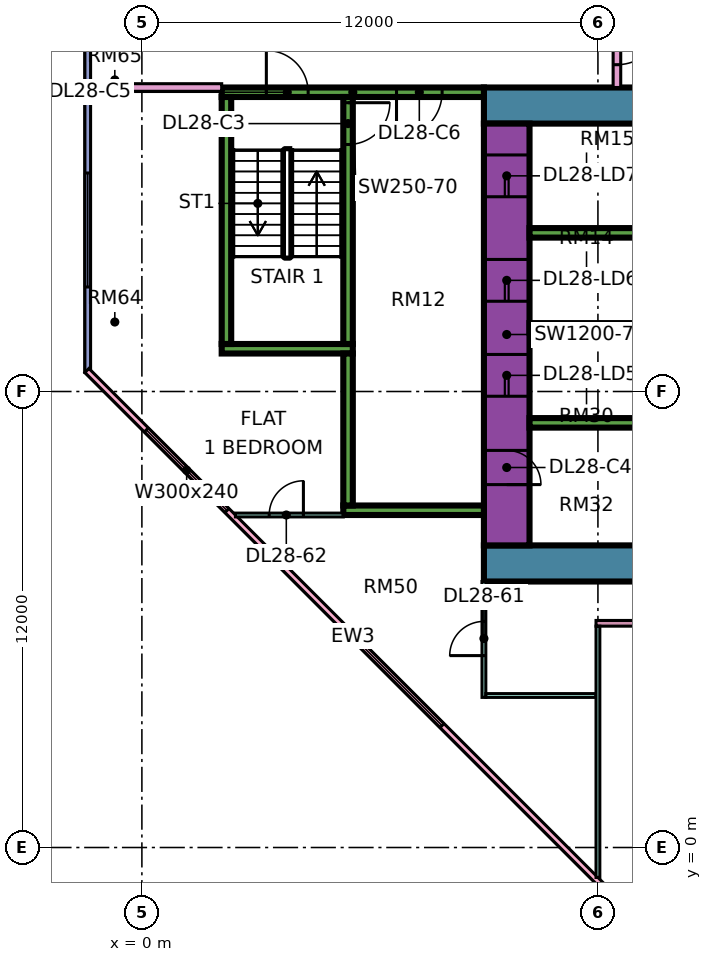
"""IFC4 building model, lengths in metres.
Left out: names, types, materials, properties, quantities, classifications, styles, units other than length and angle.
Written with IfcOpenShell. Run it as: python <this file> out.ifc"""

import sys

from ifc_helpers import new_model, si_unit, direction, frame, frame_2d, origin, place, context, subcontext, project, spatial, rectangle, extrude, element, fill, save


model = new_model("IFC4")
c1 = context("Model", 3, precision=1e-05, world=origin(), true_north=direction((0.0, 1.0)))
c2 = subcontext(c1, "Body", "Model", "MODEL_VIEW")
j1 = project(units=[si_unit("LENGTHUNIT", "METRE"), si_unit("PLANEANGLEUNIT", "RADIAN")], contexts=[c1])
p1 = place(None, origin())
s1 = spatial("IfcSite", under=j1, at=p1, CompositionType="ELEMENT")
p2 = place(p1, origin())
s2 = spatial("IfcBuilding", under=s1, at=p2, CompositionType="ELEMENT")
p3 = place(p2, frame((0.0, 0.0, 121.9)))
s3 = spatial("IfcBuildingStorey", under=s2, at=p3, CompositionType="ELEMENT", Elevation=121.9)
p4 = place(p3, frame((9.0, 7.475, 0.0), z_axis=(0.0, 0.0, 1.0), x_axis=(1.0, 0.0, 0.0)))
e1 = element("IfcWall", 1, at=p4, inside=s3, PredefinedType="SHEAR", context=c2, shape_type="SweptSolid", body=[
    extrude(rectangle(XDim=25.0, YDim=0.95, at=frame_2d((12.5, 0.0))), origin(), (0.0, 0.0, 1.0), 3.75),
])
p5 = place(p3, frame((9.0, 19.525, 0.0), z_axis=(0.0, 0.0, 1.0), x_axis=(1.0, 0.0, 0.0)))
e2 = element("IfcWall", 2, at=p5, inside=s3, PredefinedType="SHEAR", context=c2, shape_type="SweptSolid", body=[
    extrude(rectangle(XDim=25.0, YDim=0.95, at=frame_2d((12.5, 0.0))), origin(), (0.0, 0.0, 1.0), 3.75),
])
p6 = place(p5, frame((19.1, 0.0, 0.0)))
e3 = element("IfcOpeningElement", 3, at=p6, cuts=e2, PredefinedType="OPENING", context=c2, shape_type="SweptSolid", body=[
    extrude(rectangle(XDim=1.8, YDim=2.4, at=frame_2d((0.9, 1.2))), frame((0.0, 0.485, 0.0), z_axis=(0.0, -1.0, 0.0), x_axis=(1.0, 0.0, 0.0)), (0.0, 0.0, 1.0), 0.97),
])
p7 = place(p3, frame((9.6, 7.95, 0.0), z_axis=(0.0, 0.0, 1.0), x_axis=(0.0, 1.0, 0.0)))
e4 = element("IfcWall", 4, at=p7, inside=s3, PredefinedType="SHEAR", context=c2, shape_type="SweptSolid", body=[
    extrude(rectangle(XDim=11.1, YDim=1.2, at=frame_2d((5.55, 0.0))), origin(), (0.0, 0.0, 1.0), 3.75),
])
p8 = place(p7, frame((3.925, 0.0, 0.0)))
e5 = element("IfcOpeningElement", 5, at=p8, cuts=e4, PredefinedType="OPENING", context=c2, shape_type="SweptSolid", body=[
    extrude(rectangle(XDim=1.1, YDim=2.2, at=frame_2d((0.55, 1.1))), frame((0.0, 0.61, 0.0), z_axis=(0.0, -1.0, 0.0), x_axis=(1.0, 0.0, 0.0)), (0.0, 0.0, 1.0), 1.22),
])
p9 = place(p7, frame((6.425, 0.0, 0.0)))
e6 = element("IfcOpeningElement", 6, at=p9, cuts=e4, PredefinedType="OPENING", context=c2, shape_type="SweptSolid", body=[
    extrude(rectangle(XDim=1.1, YDim=2.2, at=frame_2d((0.55, 1.1))), frame((0.0, 0.61, 0.0), z_axis=(0.0, -1.0, 0.0), x_axis=(1.0, 0.0, 0.0)), (0.0, 0.0, 1.0), 1.22),
])
p10 = place(p7, frame((9.175, 0.0, 0.0)))
e7 = element("IfcOpeningElement", 7, at=p10, cuts=e4, PredefinedType="OPENING", context=c2, shape_type="SweptSolid", body=[
    extrude(rectangle(XDim=1.1, YDim=2.2, at=frame_2d((0.55, 1.1))), frame((0.0, 0.61, 0.0), z_axis=(0.0, -1.0, 0.0), x_axis=(1.0, 0.0, 0.0)), (0.0, 0.0, 1.0), 1.22),
])
p11 = place(p7, frame((1.6, 0.0, 0.0)))
e8 = element("IfcOpeningElement", 8, at=p11, cuts=e4, PredefinedType="OPENING", context=c2, shape_type="SweptSolid", body=[
    extrude(rectangle(XDim=0.9, YDim=2.1, at=frame_2d((0.45, 1.05))), frame((0.0, 0.61, 0.0), z_axis=(0.0, -1.0, 0.0), x_axis=(1.0, 0.0, 0.0)), (0.0, 0.0, 1.0), 1.22),
])
for number, where, z_axis, x_axis in (
    (9, (10.2, 11.175, 0.0), (0.0, 0.0, 1.0), (1.0, 0.0, 0.0)),
    (10, (10.2, 13.675, 0.0), (0.0, 0.0, 1.0), (1.0, 0.0, 0.0)),
    (11, (10.2, 16.175, 0.0), (0.0, 0.0, 1.0), (1.0, 0.0, 0.0)),
):
    element("IfcWall", number, at=place(p3, frame(where, z_axis=z_axis, x_axis=x_axis)), inside=s3, PredefinedType="SHEAR", context=c2, shape_type="SweptSolid", body=[
        extrude(rectangle(XDim=3.0, YDim=0.25, at=frame_2d((1.5, 0.0))), origin(), (0.0, 0.0, 1.0), 3.75),
    ])
p12 = place(p3, frame((2.1, 19.875, 0.0), z_axis=(0.0, 0.0, 1.0), x_axis=(1.0, 0.0, 0.0)))
e12 = element("IfcWall", 12, at=p12, inside=s3, PredefinedType="SHEAR", context=c2, shape_type="SweptSolid", body=[
    extrude(rectangle(XDim=6.9, YDim=0.25, at=frame_2d((3.45, 0.0))), origin(), (0.0, 0.0, 1.0), 3.75),
])
p13 = place(p12, frame((1.175, 0.0, 0.0)))
e13 = element("IfcOpeningElement", 13, at=p13, cuts=e12, PredefinedType="OPENING", context=c2, shape_type="SweptSolid", body=[
    extrude(rectangle(XDim=1.1, YDim=2.2, at=frame_2d((0.55, 1.1))), frame((0.0, 0.135, 0.0), z_axis=(0.0, -1.0, 0.0), x_axis=(1.0, 0.0, 0.0)), (0.0, 0.0, 1.0), 0.27),
])
p14 = place(p12, frame((4.6, 0.0, 0.0)))
e14 = element("IfcOpeningElement", 14, at=p14, cuts=e12, PredefinedType="OPENING", context=c2, shape_type="SweptSolid", body=[
    extrude(rectangle(XDim=1.2, YDim=2.2, at=frame_2d((0.6, 1.1))), frame((0.0, 0.135, 0.0), z_axis=(0.0, -1.0, 0.0), x_axis=(1.0, 0.0, 0.0)), (0.0, 0.0, 1.0), 0.27),
])
p15 = place(p3, frame((2.1, 13.125, 0.0), z_axis=(0.0, 0.0, 1.0), x_axis=(1.0, 0.0, 0.0)))
e15 = element("IfcWall", 15, at=p15, inside=s3, PredefinedType="SHEAR", context=c2, shape_type="SweptSolid", body=[
    extrude(rectangle(XDim=3.45, YDim=0.25, at=frame_2d((1.725, 0.0))), origin(), (0.0, 0.0, 1.0), 3.75),
])
p16 = place(p3, frame((2.225, 13.25, 0.0), z_axis=(0.0, 0.0, 1.0), x_axis=(0.0, 1.0, 0.0)))
e16 = element("IfcWall", 16, at=p16, inside=s3, PredefinedType="SHEAR", context=c2, shape_type="SweptSolid", body=[
    extrude(rectangle(XDim=6.5, YDim=0.25, at=frame_2d((3.25, 0.0))), origin(), (0.0, 0.0, 1.0), 3.75),
])
p17 = place(p3, frame((5.425, 13.25, 0.0), z_axis=(0.0, 0.0, 1.0), x_axis=(0.0, 1.0, 0.0)))
e17 = element("IfcWall", 17, at=p17, inside=s3, PredefinedType="SHEAR", context=c2, shape_type="SweptSolid", body=[
    extrude(rectangle(XDim=6.5, YDim=0.25, at=frame_2d((3.25, 0.0))), origin(), (0.0, 0.0, 1.0), 3.75),
])
p18 = place(p17, frame((5.25, 0.0, 0.0)))
e18 = element("IfcOpeningElement", 18, at=p18, cuts=e17, PredefinedType="OPENING", context=c2, shape_type="SweptSolid", body=[
    extrude(rectangle(XDim=1.1, YDim=2.2, at=frame_2d((0.55, 1.1))), frame((0.0, 0.135, 0.0), z_axis=(0.0, -1.0, 0.0), x_axis=(1.0, 0.0, 0.0)), (0.0, 0.0, 1.0), 0.27),
])
p19 = place(p3, frame((5.3, 8.875, 0.0), z_axis=(0.0, 0.0, 1.0), x_axis=(1.0, 0.0, 0.0)))
e19 = element("IfcWall", 19, at=p19, inside=s3, PredefinedType="SHEAR", context=c2, shape_type="SweptSolid", body=[
    extrude(rectangle(XDim=3.7, YDim=0.25, at=frame_2d((1.85, 0.0))), origin(), (0.0, 0.0, 1.0), 3.75),
])
p20 = place(p3, frame((5.425, 9.0, 0.0), z_axis=(0.0, 0.0, 1.0), x_axis=(0.0, 1.0, 0.0)))
e20 = element("IfcWall", 20, at=p20, inside=s3, PredefinedType="SHEAR", context=c2, shape_type="SweptSolid", body=[
    extrude(rectangle(XDim=4.0, YDim=0.25, at=frame_2d((2.0, 0.0))), origin(), (0.0, 0.0, 1.0), 3.75),
])
p21 = place(p3, frame((-1.425, 23.925, 0.0), z_axis=(0.0, 0.0, 1.0), x_axis=(0.0, -1.0, 0.0)))
e21 = element("IfcWall", 21, at=p21, inside=s3, PredefinedType="SOLIDWALL", context=c2, shape_type="SweptSolid", body=[
    extrude(rectangle(XDim=11.425, YDim=0.15, at=frame_2d((5.712, 0.0))), origin(), (0.0, 0.0, 1.0), 3.35),
])
p22 = place(p21, frame((0.312, 0.0, 0.45)))
e22 = element("IfcOpeningElement", 22, at=p22, cuts=e21, PredefinedType="OPENING", context=c2, shape_type="SweptSolid", body=[
    extrude(rectangle(XDim=0.9, YDim=2.4, at=frame_2d((0.45, 1.2))), frame((0.0, 0.085, 0.0), z_axis=(0.0, -1.0, 0.0), x_axis=(1.0, 0.0, 0.0)), (0.0, 0.0, 1.0), 0.17),
])
p23 = place(p21, frame((6.175, 0.0, 0.45)))
e23 = element("IfcOpeningElement", 23, at=p23, cuts=e21, PredefinedType="OPENING", context=c2, shape_type="SweptSolid", body=[
    extrude(rectangle(XDim=3.0, YDim=2.4, at=frame_2d((1.5, 1.2))), frame((0.0, 0.085, 0.0), z_axis=(0.0, -1.0, 0.0), x_axis=(1.0, 0.0, 0.0)), (0.0, 0.0, 1.0), 0.17),
])
p24 = place(p3, frame((-1.447, 12.553, 0.0), z_axis=(0.0, 0.0, 1.0), x_axis=(0.707106781187, -0.707106781187, 0.0)))
e24 = element("IfcWall", 24, at=p24, inside=s3, PredefinedType="SOLIDWALL", context=c2, shape_type="SweptSolid", body=[
    extrude(rectangle(XDim=19.799, YDim=0.15, at=frame_2d((9.899, 0.0))), origin(), (0.0, 0.0, 1.0), 3.35),
])
p25 = place(p24, frame((2.212, 0.0, 0.45)))
e25 = element("IfcOpeningElement", 25, at=p25, cuts=e24, PredefinedType="OPENING", context=c2, shape_type="SweptSolid", body=[
    extrude(rectangle(XDim=3.0, YDim=2.4, at=frame_2d((1.5, 1.2))), frame((0.0, 0.085, 0.0), z_axis=(0.0, -1.0, 0.0), x_axis=(1.0, 0.0, 0.0)), (0.0, 0.0, 1.0), 0.17),
])
p26 = place(p24, frame((10.216, 0.0, 0.45)))
e26 = element("IfcOpeningElement", 26, at=p26, cuts=e24, PredefinedType="OPENING", context=c2, shape_type="SweptSolid", body=[
    extrude(rectangle(XDim=3.0, YDim=2.4, at=frame_2d((1.5, 1.2))), frame((0.0, 0.085, 0.0), z_axis=(0.0, -1.0, 0.0), x_axis=(1.0, 0.0, 0.0)), (0.0, 0.0, 1.0), 0.17),
])
p27 = place(p3, frame((-1.35, 20.0, 0.0), z_axis=(0.0, 0.0, 1.0), x_axis=(1.0, 0.0, 0.0)))
e27 = element("IfcWall", 27, at=p27, inside=s3, PredefinedType="PARTITIONING", context=c2, shape_type="SweptSolid", body=[
    extrude(rectangle(XDim=3.45, YDim=0.2, at=frame_2d((1.725, 0.0))), origin(), (0.0, 0.0, 1.0), 3.35),
])
p28 = place(p3, frame((2.461, 8.75, 0.0), z_axis=(0.0, 0.0, 1.0), x_axis=(1.0, 0.0, 0.0)))
e28 = element("IfcWall", 28, at=p28, inside=s3, PredefinedType="PARTITIONING", context=c2, shape_type="SweptSolid", body=[
    extrude(rectangle(XDim=2.839, YDim=0.1, at=frame_2d((1.419, 0.0))), origin(), (0.0, 0.0, 1.0), 3.35),
])
p29 = place(p28, frame((0.889, 0.0, 0.0)))
e29 = element("IfcOpeningElement", 29, at=p29, cuts=e28, PredefinedType="OPENING", context=c2, shape_type="SweptSolid", body=[
    extrude(rectangle(XDim=0.9, YDim=2.1, at=frame_2d((0.45, 1.05))), frame((0.0, 0.06, 0.0), z_axis=(0.0, -1.0, 0.0), x_axis=(1.0, 0.0, 0.0)), (0.0, 0.0, 1.0), 0.12),
])
p30 = place(p3, frame((9.0, 3.95, 0.0), z_axis=(0.0, 0.0, 1.0), x_axis=(0.0, 1.0, 0.0)))
e30 = element("IfcWall", 30, at=p30, inside=s3, PredefinedType="PARTITIONING", context=c2, shape_type="SweptSolid", body=[
    extrude(rectangle(XDim=3.05, YDim=0.1, at=frame_2d((1.525, 0.0))), origin(), (0.0, 0.0, 1.0), 3.35),
])
p31 = place(p30, frame((1.1, 0.0, 0.0)))
e31 = element("IfcOpeningElement", 31, at=p31, cuts=e30, PredefinedType="OPENING", context=c2, shape_type="SweptSolid", body=[
    extrude(rectangle(XDim=0.9, YDim=2.1, at=frame_2d((0.45, 1.05))), frame((0.0, 0.06, 0.0), z_axis=(0.0, -1.0, 0.0), x_axis=(1.0, 0.0, 0.0)), (0.0, 0.0, 1.0), 0.12),
])
p32 = place(p3, frame((9.05, 4.0, 0.0), z_axis=(0.0, 0.0, 1.0), x_axis=(1.0, 0.0, 0.0)))
e32 = element("IfcWall", 32, at=p32, inside=s3, PredefinedType="PARTITIONING", context=c2, shape_type="SweptSolid", body=[
    extrude(rectangle(XDim=2.9, YDim=0.1, at=frame_2d((1.45, 0.0))), origin(), (0.0, 0.0, 1.0), 3.35),
])
p33 = place(p3, frame((11.95, 5.9, 0.0), z_axis=(0.0, 0.0, 1.0), x_axis=(1.0, 0.0, 0.0)))
e33 = element("IfcWall", 33, at=p33, inside=s3, PredefinedType="PARTITIONING", context=c2, shape_type="SweptSolid", body=[
    extrude(rectangle(XDim=21.1, YDim=0.15, at=frame_2d((10.55, 0.0))), origin(), (0.0, 0.0, 1.0), 3.35),
])
p34 = place(p33, frame((16.1, 0.0, 0.0)))
e34 = element("IfcOpeningElement", 34, at=p34, cuts=e33, PredefinedType="OPENING", context=c2, shape_type="SweptSolid", body=[
    extrude(rectangle(XDim=0.9, YDim=2.1, at=frame_2d((0.45, 1.05))), frame((0.0, 0.085, 0.0), z_axis=(0.0, -1.0, 0.0), x_axis=(1.0, 0.0, 0.0)), (0.0, 0.0, 1.0), 0.17),
])
p35 = place(p33, frame((13.1, 0.0, 0.0)))
e35 = element("IfcOpeningElement", 35, at=p35, cuts=e33, PredefinedType="OPENING", context=c2, shape_type="SweptSolid", body=[
    extrude(rectangle(XDim=0.9, YDim=2.1, at=frame_2d((0.45, 1.05))), frame((0.0, 0.085, 0.0), z_axis=(0.0, -1.0, 0.0), x_axis=(1.0, 0.0, 0.0)), (0.0, 0.0, 1.0), 0.17),
])
p36 = place(p33, frame((4.1, 0.0, 0.0)))
e36 = element("IfcOpeningElement", 36, at=p36, cuts=e33, PredefinedType="OPENING", context=c2, shape_type="SweptSolid", body=[
    extrude(rectangle(XDim=0.9, YDim=2.1, at=frame_2d((0.45, 1.05))), frame((0.0, 0.085, 0.0), z_axis=(0.0, -1.0, 0.0), x_axis=(1.0, 0.0, 0.0)), (0.0, 0.0, 1.0), 0.17),
])
p37 = place(p3, frame((12.0, -0.788, 0.0), z_axis=(0.0, 0.0, 1.0), x_axis=(0.0, 1.0, 0.0)))
e37 = element("IfcWall", 37, at=p37, inside=s3, PredefinedType="PARTITIONING", context=c2, shape_type="SweptSolid", body=[
    extrude(rectangle(XDim=6.613, YDim=0.1, at=frame_2d((3.306, 0.0))), origin(), (0.0, 0.0, 1.0), 3.35),
])
p38 = place(p3, frame((12.5, 20.0, 0.0), z_axis=(0.0, 0.0, 1.0), x_axis=(0.0, 1.0, 0.0)))
e38 = element("IfcWall", 38, at=p38, inside=s3, PredefinedType="PARTITIONING", context=c2, shape_type="SweptSolid", body=[
    extrude(rectangle(XDim=43.0, YDim=0.2, at=frame_2d((21.5, 0.0))), origin(), (0.0, 0.0, 1.0), 3.35),
])
p39 = place(p38, frame((19.65, 0.0, 0.0)))
e39 = element("IfcOpeningElement", 39, at=p39, cuts=e38, PredefinedType="OPENING", context=c2, shape_type="SweptSolid", body=[
    extrude(rectangle(XDim=1.0, YDim=2.1, at=frame_2d((0.5, 1.05))), frame((0.0, 0.11, 0.0), z_axis=(0.0, -1.0, 0.0), x_axis=(1.0, 0.0, 0.0)), (0.0, 0.0, 1.0), 0.22),
])
p40 = place(p38, frame((0.6, 0.0, 0.0)))
e40 = element("IfcOpeningElement", 40, at=p40, cuts=e38, PredefinedType="OPENING", context=c2, shape_type="SweptSolid", body=[
    extrude(rectangle(XDim=1.2, YDim=2.1, at=frame_2d((0.6, 1.05))), frame((0.0, 0.11, 0.0), z_axis=(0.0, -1.0, 0.0), x_axis=(1.0, 0.0, 0.0)), (0.0, 0.0, 1.0), 0.22),
])
p41 = place(p38, frame((4.5, 0.0, 0.0)))
e41 = element("IfcOpeningElement", 41, at=p41, cuts=e38, PredefinedType="OPENING", context=c2, shape_type="SweptSolid", body=[
    extrude(rectangle(XDim=1.0, YDim=2.1, at=frame_2d((0.5, 1.05))), frame((0.0, 0.11, 0.0), z_axis=(0.0, -1.0, 0.0), x_axis=(1.0, 0.0, 0.0)), (0.0, 0.0, 1.0), 0.22),
])
p42 = place(p23, origin())
e42 = element("IfcWindow", 42, at=p42, inside=s3, PartitioningType="SINGLE_PANEL", PredefinedType="WINDOW", context=c2, shape_type="SweptSolid", body=[
    extrude(rectangle(XDim=3.0, YDim=2.4, at=frame_2d((1.5, 1.2))), frame((0.0, 0.03, 0.0), z_axis=(0.0, -1.0, 0.0), x_axis=(1.0, 0.0, 0.0)), (0.0, 0.0, 1.0), 0.06),
])
fill(e23, e42)
p43 = place(p25, origin())
e43 = element("IfcWindow", 43, at=p43, inside=s3, PartitioningType="SINGLE_PANEL", PredefinedType="WINDOW", context=c2, shape_type="SweptSolid", body=[
    extrude(rectangle(XDim=3.0, YDim=2.4, at=frame_2d((1.5, 1.2))), frame((0.0, 0.03, 0.0), z_axis=(0.0, -1.0, 0.0), x_axis=(1.0, 0.0, 0.0)), (0.0, 0.0, 1.0), 0.06),
])
fill(e25, e43)
p44 = place(p26, origin())
e44 = element("IfcWindow", 44, at=p44, inside=s3, PartitioningType="SINGLE_PANEL", PredefinedType="WINDOW", context=c2, shape_type="SweptSolid", body=[
    extrude(rectangle(XDim=3.0, YDim=2.4, at=frame_2d((1.5, 1.2))), frame((0.0, 0.03, 0.0), z_axis=(0.0, -1.0, 0.0), x_axis=(1.0, 0.0, 0.0)), (0.0, 0.0, 1.0), 0.06),
])
fill(e26, e44)
p45 = place(p8, origin())
e45 = element("IfcDoor", 45, at=p45, inside=s3, OperationType="DOUBLE_DOOR_SLIDING", PredefinedType="DOOR", context=c2, shape_type="SweptSolid", body=[
    extrude(rectangle(XDim=1.1, YDim=2.2, at=frame_2d((0.55, 1.1))), frame((0.0, 0.025, 0.0), z_axis=(0.0, -1.0, 0.0), x_axis=(1.0, 0.0, 0.0)), (0.0, 0.0, 1.0), 0.05),
])
fill(e5, e45)
p46 = place(p9, origin())
e46 = element("IfcDoor", 46, at=p46, inside=s3, OperationType="DOUBLE_DOOR_SLIDING", PredefinedType="DOOR", context=c2, shape_type="SweptSolid", body=[
    extrude(rectangle(XDim=1.1, YDim=2.2, at=frame_2d((0.55, 1.1))), frame((0.0, 0.025, 0.0), z_axis=(0.0, -1.0, 0.0), x_axis=(1.0, 0.0, 0.0)), (0.0, 0.0, 1.0), 0.05),
])
fill(e6, e46)
p47 = place(p10, origin())
e47 = element("IfcDoor", 47, at=p47, inside=s3, OperationType="DOUBLE_DOOR_SLIDING", PredefinedType="DOOR", context=c2, shape_type="SweptSolid", body=[
    extrude(rectangle(XDim=1.1, YDim=2.2, at=frame_2d((0.55, 1.1))), frame((0.0, 0.025, 0.0), z_axis=(0.0, -1.0, 0.0), x_axis=(1.0, 0.0, 0.0)), (0.0, 0.0, 1.0), 0.05),
])
fill(e7, e47)
p48 = place(p18, origin())
e48 = element("IfcDoor", 48, at=p48, inside=s3, OperationType="SINGLE_SWING_RIGHT", PredefinedType="DOOR", context=c2, shape_type="SweptSolid", body=[
    extrude(rectangle(XDim=1.1, YDim=2.2, at=frame_2d((0.55, 1.1))), frame((0.0, 0.025, 0.0), z_axis=(0.0, -1.0, 0.0), x_axis=(1.0, 0.0, 0.0)), (0.0, 0.0, 1.0), 0.05),
])
fill(e18, e48)
p49 = place(p11, frame((0.9, 0.0, 0.0), z_axis=(0.0, 0.0, 1.0), x_axis=(-1.0, 0.0, 0.0)))
e49 = element("IfcDoor", 49, at=p49, inside=s3, OperationType="SINGLE_SWING_LEFT", PredefinedType="DOOR", context=c2, shape_type="SweptSolid", body=[
    extrude(rectangle(XDim=0.9, YDim=2.1, at=frame_2d((0.45, 1.05))), frame((0.0, 0.025, 0.0), z_axis=(0.0, -1.0, 0.0), x_axis=(1.0, 0.0, 0.0)), (0.0, 0.0, 1.0), 0.05),
])
fill(e8, e49)
p50 = place(p13, origin())
e50 = element("IfcDoor", 50, at=p50, inside=s3, OperationType="SINGLE_SWING_LEFT", PredefinedType="DOOR", context=c2, shape_type="SweptSolid", body=[
    extrude(rectangle(XDim=1.1, YDim=2.2, at=frame_2d((0.55, 1.1))), frame((0.0, 0.025, 0.0), z_axis=(0.0, -1.0, 0.0), x_axis=(1.0, 0.0, 0.0)), (0.0, 0.0, 1.0), 0.05),
])
fill(e13, e50)
p51 = place(p14, frame((1.2, 0.0, 0.0), z_axis=(0.0, 0.0, 1.0), x_axis=(-1.0, 0.0, 0.0)))
e51 = element("IfcDoor", 51, at=p51, inside=s3, OperationType="SINGLE_SWING_LEFT", PredefinedType="DOOR", context=c2, shape_type="SweptSolid", body=[
    extrude(rectangle(XDim=1.2, YDim=2.2, at=frame_2d((0.6, 1.1))), frame((0.0, 0.025, 0.0), z_axis=(0.0, -1.0, 0.0), x_axis=(1.0, 0.0, 0.0)), (0.0, 0.0, 1.0), 0.05),
])
fill(e14, e51)
p52 = place(p40, origin())
e52 = element("IfcDoor", 52, at=p52, inside=s3, OperationType="SINGLE_SWING_RIGHT", PredefinedType="DOOR", context=c2, shape_type="SweptSolid", body=[
    extrude(rectangle(XDim=1.2, YDim=2.1, at=frame_2d((0.6, 1.05))), frame((0.0, 0.025, 0.0), z_axis=(0.0, -1.0, 0.0), x_axis=(1.0, 0.0, 0.0)), (0.0, 0.0, 1.0), 0.05),
])
fill(e40, e52)
p53 = place(p31, origin())
e53 = element("IfcDoor", 53, at=p53, inside=s3, OperationType="SINGLE_SWING_LEFT", PredefinedType="DOOR", context=c2, shape_type="SweptSolid", body=[
    extrude(rectangle(XDim=0.9, YDim=2.1, at=frame_2d((0.45, 1.05))), frame((0.0, 0.025, 0.0), z_axis=(0.0, -1.0, 0.0), x_axis=(1.0, 0.0, 0.0)), (0.0, 0.0, 1.0), 0.05),
])
fill(e31, e53)
p54 = place(p29, frame((0.9, 0.0, 0.0), z_axis=(0.0, 0.0, 1.0), x_axis=(-1.0, 0.0, 0.0)))
e54 = element("IfcDoor", 54, at=p54, inside=s3, OperationType="SINGLE_SWING_RIGHT", PredefinedType="DOOR", context=c2, shape_type="SweptSolid", body=[
    extrude(rectangle(XDim=0.9, YDim=2.1, at=frame_2d((0.45, 1.05))), frame((0.0, 0.025, 0.0), z_axis=(0.0, -1.0, 0.0), x_axis=(1.0, 0.0, 0.0)), (0.0, 0.0, 1.0), 0.05),
])
fill(e29, e54)
save(model, sys.argv[1])
